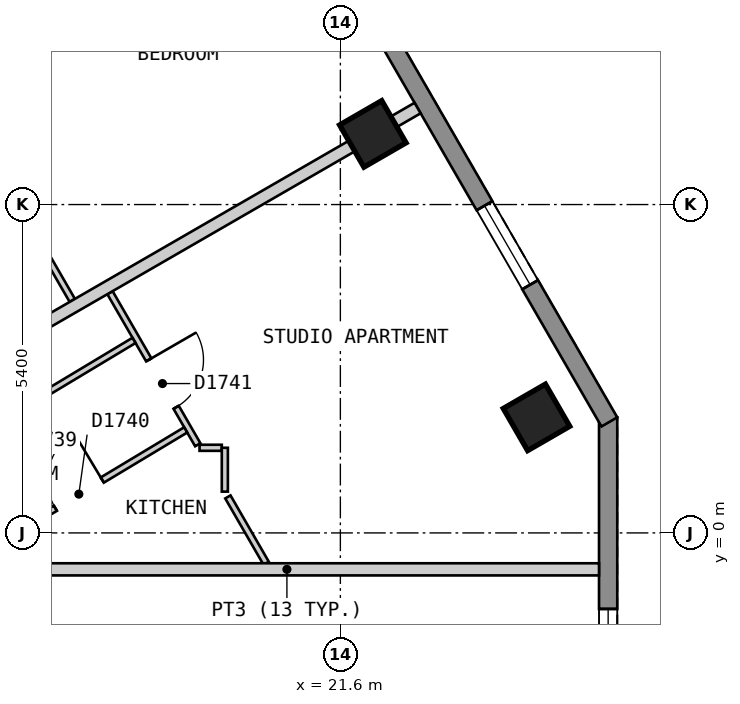
"""IFC4 building model, lengths in metres.
Left out: names, types, materials, properties, quantities, classifications, styles, units other than length and angle.
Written with IfcOpenShell. Run it as: python <this file> out.ifc"""

import sys

from ifc_helpers import new_model, si_unit, direction, frame, frame_2d, origin, origin_2d, place, context, subcontext, project, spatial, polyline, rectangle, outline, extrude, element, fill, save


model = new_model("IFC4")
c1 = context("Model", 3, precision=1e-05, world=origin(), true_north=direction((0.0, 1.0)))
c2 = subcontext(c1, "Body", "Model", "MODEL_VIEW")
j1 = project(units=[si_unit("LENGTHUNIT", "METRE"), si_unit("PLANEANGLEUNIT", "RADIAN")], contexts=[c1])
p1 = place(None, origin())
s1 = spatial("IfcSite", under=j1, at=p1, CompositionType="ELEMENT")
p2 = place(p1, origin())
s2 = spatial("IfcBuilding", under=s1, at=p2, CompositionType="ELEMENT")
p3 = place(p2, frame((0.0, 0.0, 187.2)))
s3 = spatial("IfcBuildingStorey", under=s2, at=p3, CompositionType="ELEMENT", Elevation=187.2)
for number, where, z_axis, x_axis in (
    (1, (24.826, 1.9, 0.0), (0.0, 0.0, 1.0), (-0.5, 0.866, 0.0)),
    (2, (22.134, 6.562, 0.0), (0.0, 0.0, 1.0), (-0.5, 0.866, 0.0)),
):
    element("IfcColumn", number, at=place(p3, frame(where, z_axis=z_axis, x_axis=x_axis)), inside=s3, PredefinedType="COLUMN", context=c2, shape_type="SweptSolid", body=[
        extrude(rectangle(XDim=0.8, YDim=0.8, at=origin_2d()), origin(), (0.0, 0.0, 1.0), 3.0),
    ])
p4 = place(p3, frame((26.004, -3.1, 0.0), z_axis=(0.0, 0.0, 1.0), x_axis=(0.0, 1.0, 0.0)))
e3 = element("IfcWall", 3, at=p4, inside=s3, PredefinedType="SOLIDWALL", context=c2, shape_type="SweptSolid", body=[
    extrude(outline(polyline([(0.0, -0.15), (5.0, -0.15), (4.92, 0.15), (0.08, 0.15), (0.0, -0.15)])), origin(), (0.0, 0.0, 1.0), 2.7),
])
p5 = place(p4, frame((0.65, 0.0, 0.15)))
e4 = element("IfcOpeningElement", 4, at=p5, cuts=e3, PredefinedType="OPENING", context=c2, shape_type="SweptSolid", body=[
    extrude(rectangle(XDim=1.2, YDim=2.1, at=frame_2d((0.6, 1.05))), frame((0.0, 0.16, 0.0), z_axis=(0.0, -1.0, 0.0), x_axis=(1.0, 0.0, 0.0)), (0.0, 0.0, 1.0), 0.32),
])
p6 = place(p3, frame((26.024, 1.825, 0.0), z_axis=(0.0, 0.0, 1.0), x_axis=(-0.500010537973, 0.866019319597, 0.0)))
e5 = element("IfcWall", 5, at=p6, inside=s3, PredefinedType="SOLIDWALL", context=c2, shape_type="SweptSolid", body=[
    extrude(outline(polyline([(0.0, -0.15), (22.863, -0.15), (22.783, 0.15), (0.08, 0.15), (0.0, -0.15)])), origin(), (0.0, 0.0, 1.0), 2.7),
])
p7 = place(p6, frame((2.606, 0.0, 0.15)))
e6 = element("IfcOpeningElement", 6, at=p7, cuts=e5, PredefinedType="OPENING", context=c2, shape_type="SweptSolid", body=[
    extrude(rectangle(XDim=1.5, YDim=2.1, at=frame_2d((0.75, 1.05))), frame((0.0, 0.16, 0.0), z_axis=(0.0, -1.0, 0.0), x_axis=(1.0, 0.0, 0.0)), (0.0, 0.0, 1.0), 0.32),
])
p8 = place(p6, frame((7.99, 0.0, 0.15)))
e7 = element("IfcOpeningElement", 7, at=p8, cuts=e5, PredefinedType="OPENING", context=c2, shape_type="SweptSolid", body=[
    extrude(rectangle(XDim=1.5, YDim=2.1, at=frame_2d((0.75, 1.05))), frame((0.0, 0.16, 0.0), z_axis=(0.0, -1.0, 0.0), x_axis=(1.0, 0.0, 0.0)), (0.0, 0.0, 1.0), 0.32),
])
p9 = place(p6, frame((13.373, 0.0, 0.15)))
e8 = element("IfcOpeningElement", 8, at=p9, cuts=e5, PredefinedType="OPENING", context=c2, shape_type="SweptSolid", body=[
    extrude(rectangle(XDim=1.5, YDim=2.1, at=frame_2d((0.75, 1.05))), frame((0.0, 0.16, 0.0), z_axis=(0.0, -1.0, 0.0), x_axis=(1.0, 0.0, 0.0)), (0.0, 0.0, 1.0), 0.32),
])
p10 = place(p6, frame((18.758, 0.0, 0.15)))
e9 = element("IfcOpeningElement", 9, at=p10, cuts=e5, PredefinedType="OPENING", context=c2, shape_type="SweptSolid", body=[
    extrude(rectangle(XDim=1.5, YDim=2.1, at=frame_2d((0.75, 1.05))), frame((0.0, 0.16, 0.0), z_axis=(0.0, -1.0, 0.0), x_axis=(1.0, 0.0, 0.0)), (0.0, 0.0, 1.0), 0.32),
])
p11 = place(p3, frame((14.895, 7.8, 0.0), z_axis=(0.0, 0.0, 1.0), x_axis=(0.500050787847, -0.865996079421, 0.0)))
e10 = element("IfcWall", 10, at=p11, inside=s3, PredefinedType="PARTITIONING", context=c2, shape_type="SweptSolid", body=[
    extrude(rectangle(XDim=4.591, YDim=0.1, at=frame_2d((2.296, 0.0))), origin(), (0.0, 0.0, 1.0), 2.7),
])
p12 = place(p3, frame((17.811, 3.951, 0.0), z_axis=(0.0, 0.0, 1.0), x_axis=(0.499976149225, -0.866039173598, 0.0)))
e11 = element("IfcWall", 11, at=p12, inside=s3, PredefinedType="PARTITIONING", context=c2, shape_type="SweptSolid", body=[
    extrude(rectangle(XDim=2.888, YDim=0.1, at=frame_2d((1.444, 0.0))), origin(), (0.0, 0.0, 1.0), 2.7),
])
p13 = place(p12, frame((1.276, 0.0, 0.0)))
e12 = element("IfcOpeningElement", 12, at=p13, cuts=e11, PredefinedType="OPENING", context=c2, shape_type="SweptSolid", body=[
    extrude(rectangle(XDim=0.9, YDim=2.1, at=frame_2d((0.45, 1.05))), frame((0.0, 0.06, 0.0), z_axis=(0.0, -1.0, 0.0), x_axis=(1.0, 0.0, 0.0)), (0.0, 0.0, 1.0), 0.12),
])
p14 = place(p3, frame((19.75, 0.592, 0.0), z_axis=(0.0, 0.0, 1.0), x_axis=(0.499974077718, -0.866040369504, 0.0)))
e13 = element("IfcWall", 13, at=p14, inside=s3, PredefinedType="PARTITIONING", context=c2, shape_type="SweptSolid", body=[
    extrude(rectangle(XDim=1.26, YDim=0.1, at=frame_2d((0.63, 0.0))), origin(), (0.0, 0.0, 1.0), 2.7),
])
p15 = place(p3, frame((19.284, 1.4, 0.0), z_axis=(0.0, 0.0, 1.0), x_axis=(1.0, 0.0, 0.0)))
e14 = element("IfcWall", 14, at=p15, inside=s3, PredefinedType="PARTITIONING", context=c2, shape_type="SweptSolid", body=[
    extrude(rectangle(XDim=0.366, YDim=0.1, at=frame_2d((0.183, 0.0))), origin(), (0.0, 0.0, 1.0), 2.7),
])
p16 = place(p3, frame((19.7, 0.679, 0.0), z_axis=(0.0, 0.0, 1.0), x_axis=(0.0, 1.0, 0.0)))
e15 = element("IfcWall", 15, at=p16, inside=s3, PredefinedType="PARTITIONING", context=c2, shape_type="SweptSolid", body=[
    extrude(rectangle(XDim=0.721, YDim=0.1, at=frame_2d((0.36, 0.0))), origin(), (0.0, 0.0, 1.0), 2.7),
])
p17 = place(p3, frame((14.734, 1.08, 0.0), z_axis=(0.0, 0.0, 1.0), x_axis=(0.857205608004, 0.514974315482, 0.0)))
e16 = element("IfcWall", 16, at=p17, inside=s3, PredefinedType="PARTITIONING", context=c2, shape_type="SweptSolid", body=[
    extrude(rectangle(XDim=4.051, YDim=0.1, at=frame_2d((2.025, 0.0))), origin(), (0.0, 0.0, 1.0), 2.7),
])
p18 = place(p17, frame((1.6, 0.0, 0.0)))
e17 = element("IfcOpeningElement", 17, at=p18, cuts=e16, PredefinedType="OPENING", context=c2, shape_type="SweptSolid", body=[
    extrude(rectangle(XDim=0.8, YDim=2.1, at=frame_2d((0.4, 1.05))), frame((0.0, 0.06, 0.0), z_axis=(0.0, -1.0, 0.0), x_axis=(1.0, 0.0, 0.0)), (0.0, 0.0, 1.0), 0.12),
])
p19 = place(p3, frame((15.499, -0.444, 0.0), z_axis=(0.0, 0.0, 1.0), x_axis=(0.857061798163, 0.515213619899, 0.0)))
e18 = element("IfcWall", 18, at=p19, inside=s3, PredefinedType="PARTITIONING", context=c2, shape_type="SweptSolid", body=[
    extrude(rectangle(XDim=4.15, YDim=0.1, at=frame_2d((2.075, 0.0))), origin(), (0.0, 0.0, 1.0), 2.7),
])
p20 = place(p19, frame((1.65, 0.0, 0.0)))
e19 = element("IfcOpeningElement", 19, at=p20, cuts=e18, PredefinedType="OPENING", context=c2, shape_type="SweptSolid", body=[
    extrude(rectangle(XDim=0.9, YDim=2.1, at=frame_2d((0.45, 1.05))), frame((0.0, 0.06, 0.0), z_axis=(0.0, -1.0, 0.0), x_axis=(1.0, 0.0, 0.0)), (0.0, 0.0, 1.0), 0.12),
])
p21 = place(p3, frame((15.588, -0.599, 0.0), z_axis=(0.0, 0.0, 1.0), x_axis=(1.0, 0.0, 0.0)))
e20 = element("IfcWall", 20, at=p21, inside=s3, PredefinedType="PARTITIONING", context=c2, shape_type="SweptSolid", body=[
    extrude(rectangle(XDim=10.266, YDim=0.2, at=frame_2d((5.133, 0.0))), origin(), (0.0, 0.0, 1.0), 2.7),
])
p22 = place(p3, frame((14.21, 1.987, 0.0), z_axis=(0.0, 0.0, 1.0), x_axis=(0.866022959057, 0.500004234368, 0.0)))
e21 = element("IfcWall", 21, at=p22, inside=s3, PredefinedType="PARTITIONING", context=c2, shape_type="SweptSolid", body=[
    extrude(rectangle(XDim=10.0, YDim=0.2, at=frame_2d((5.0, 0.0))), origin(), (0.0, 0.0, 1.0), 2.7),
])
p23 = place(p5, origin())
e22 = element("IfcWindow", 22, at=p23, inside=s3, PartitioningType="SINGLE_PANEL", PredefinedType="WINDOW", context=c2, shape_type="SweptSolid", body=[
    extrude(rectangle(XDim=1.2, YDim=2.1, at=frame_2d((0.6, 1.05))), frame((0.0, 0.03, 0.0), z_axis=(0.0, -1.0, 0.0), x_axis=(1.0, 0.0, 0.0)), (0.0, 0.0, 1.0), 0.06),
])
fill(e4, e22)
p24 = place(p7, origin())
e23 = element("IfcWindow", 23, at=p24, inside=s3, PartitioningType="SINGLE_PANEL", PredefinedType="WINDOW", context=c2, shape_type="SweptSolid", body=[
    extrude(rectangle(XDim=1.5, YDim=2.1, at=frame_2d((0.75, 1.05))), frame((0.0, 0.03, 0.0), z_axis=(0.0, -1.0, 0.0), x_axis=(1.0, 0.0, 0.0)), (0.0, 0.0, 1.0), 0.06),
])
fill(e6, e23)
p25 = place(p20, origin())
e24 = element("IfcDoor", 24, at=p25, inside=s3, OperationType="SINGLE_SWING_RIGHT", PredefinedType="DOOR", context=c2, shape_type="SweptSolid", body=[
    extrude(rectangle(XDim=0.9, YDim=2.1, at=frame_2d((0.45, 1.05))), frame((0.0, 0.025, 0.0), z_axis=(0.0, -1.0, 0.0), x_axis=(1.0, 0.0, 0.0)), (0.0, 0.0, 1.0), 0.05),
])
fill(e19, e24)
p26 = place(p13, origin())
e25 = element("IfcDoor", 25, at=p26, inside=s3, OperationType="SINGLE_SWING_LEFT", PredefinedType="DOOR", context=c2, shape_type="SweptSolid", body=[
    extrude(rectangle(XDim=0.9, YDim=2.1, at=frame_2d((0.45, 1.05))), frame((0.0, 0.025, 0.0), z_axis=(0.0, -1.0, 0.0), x_axis=(1.0, 0.0, 0.0)), (0.0, 0.0, 1.0), 0.05),
])
fill(e12, e25)
save(model, sys.argv[1])
